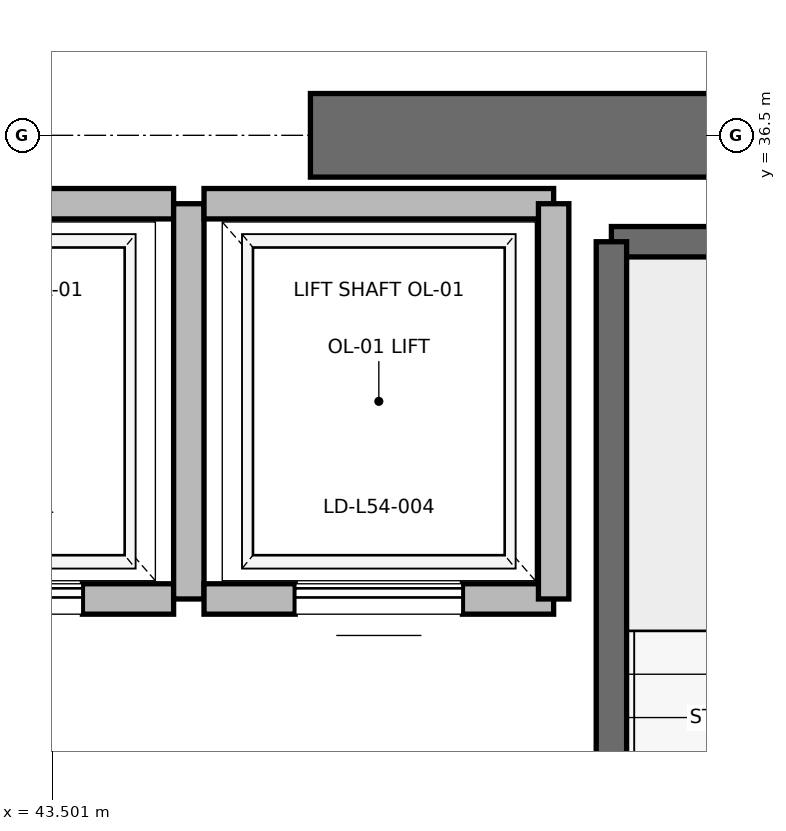
"""IFC4 building model, lengths in metres.
Left out: names, types, materials, properties, quantities, classifications, styles, units other than length and angle.
Written with IfcOpenShell. Run it as: python <this file> out.ifc"""

import sys

from ifc_helpers import new_model, si_unit, direction, frame, frame_2d, origin, place, context, subcontext, project, spatial, rectangle, extrude, element, fill, save


model = new_model("IFC4")
c1 = context("Model", 3, precision=1e-05, world=origin(), true_north=direction((0.0, 1.0)))
c2 = subcontext(c1, "Body", "Model", "MODEL_VIEW")
j1 = project(units=[si_unit("LENGTHUNIT", "METRE"), si_unit("PLANEANGLEUNIT", "RADIAN")], contexts=[c1])
p1 = place(None, origin())
s1 = spatial("IfcSite", under=j1, at=p1, CompositionType="ELEMENT")
p2 = place(p1, origin())
s2 = spatial("IfcBuilding", under=s1, at=p2, CompositionType="ELEMENT")
p3 = place(p2, frame((0.0, 0.0, 233.2)))
s3 = spatial("IfcBuildingStorey", under=s2, at=p3, CompositionType="ELEMENT", Elevation=233.2)
p4 = place(p3, frame((45.2, 36.5, 0.0), z_axis=(0.0, 0.0, 1.0), x_axis=(1.0, 0.0, 0.0)))
e1 = element("IfcWall", 1, at=p4, inside=s3, PredefinedType="SHEAR", context=c2, shape_type="SweptSolid", body=[
    extrude(rectangle(XDim=5.8, YDim=0.55, at=frame_2d((2.9, 0.0))), origin(), (0.0, 0.0, 1.0), 4.7),
])
p5 = place(p3, frame((47.18, 35.8, 0.0), z_axis=(0.0, 0.0, 1.0), x_axis=(1.0, 0.0, 0.0)))
e2 = element("IfcWall", 2, at=p5, inside=s3, PredefinedType="SOLIDWALL", context=c2, shape_type="SweptSolid", body=[
    extrude(rectangle(XDim=3.12, YDim=0.2, at=frame_2d((1.56, 0.0))), origin(), (0.0, 0.0, 1.0), 4.7),
])
p6 = place(p3, frame((47.18, 27.62, 0.0), z_axis=(0.0, 0.0, 1.0), x_axis=(0.0, 1.0, 0.0)))
e3 = element("IfcWall", 3, at=p6, inside=s3, PredefinedType="SOLIDWALL", context=c2, shape_type="SweptSolid", body=[
    extrude(rectangle(XDim=8.18, YDim=0.2, at=frame_2d((4.09, 0.0))), origin(), (0.0, 0.0, 1.0), 4.7),
])
p7 = place(p3, frame((42.0, 33.45, 0.0), z_axis=(0.0, 0.0, 1.0), x_axis=(1.0, 0.0, 0.0)))
e4 = element("IfcWall", 4, at=p7, inside=s3, PredefinedType="SOLIDWALL", context=c2, shape_type="SweptSolid", body=[
    extrude(rectangle(XDim=2.3, YDim=0.2, at=frame_2d((1.15, 0.0))), origin(), (0.0, 0.0, 1.0), 4.7),
])
p8 = place(p7, frame((0.6, 0.0, 0.0)))
e5 = element("IfcOpeningElement", 5, at=p8, cuts=e4, PredefinedType="OPENING", context=c2, shape_type="SweptSolid", body=[
    extrude(rectangle(XDim=1.1, YDim=2.2, at=frame_2d((0.55, 1.1))), frame((0.0, 0.1, 0.0), z_axis=(0.0, -1.0, 0.0), x_axis=(1.0, 0.0, 0.0)), (0.0, 0.0, 1.0), 0.2),
])
p9 = place(p3, frame((44.3, 36.05, 0.0), z_axis=(0.0, 0.0, 1.0), x_axis=(-1.0, 0.0, 0.0)))
e6 = element("IfcWall", 6, at=p9, inside=s3, PredefinedType="SOLIDWALL", context=c2, shape_type="SweptSolid", body=[
    extrude(rectangle(XDim=2.3, YDim=0.2, at=frame_2d((1.15, 0.0))), origin(), (0.0, 0.0, 1.0), 3.68),
])
p10 = place(p3, frame((44.4, 33.45, 0.0), z_axis=(0.0, 0.0, 1.0), x_axis=(0.0, 1.0, 0.0)))
e7 = element("IfcWall", 7, at=p10, inside=s3, PredefinedType="SOLIDWALL", context=c2, shape_type="SweptSolid", body=[
    extrude(rectangle(XDim=2.6, YDim=0.2, at=frame_2d((1.3, 0.0))), origin(), (0.0, 0.0, 1.0), 3.68),
])
p11 = place(p3, frame((44.5, 33.45, 0.0), z_axis=(0.0, 0.0, 1.0), x_axis=(1.0, 0.0, 0.0)))
e8 = element("IfcWall", 8, at=p11, inside=s3, PredefinedType="SOLIDWALL", context=c2, shape_type="SweptSolid", body=[
    extrude(rectangle(XDim=2.3, YDim=0.2, at=frame_2d((1.15, 0.0))), origin(), (0.0, 0.0, 1.0), 4.7),
])
p12 = place(p11, frame((0.6, 0.0, 0.0)))
e9 = element("IfcOpeningElement", 9, at=p12, cuts=e8, PredefinedType="OPENING", context=c2, shape_type="SweptSolid", body=[
    extrude(rectangle(XDim=1.1, YDim=2.2, at=frame_2d((0.55, 1.1))), frame((0.0, 0.1, 0.0), z_axis=(0.0, -1.0, 0.0), x_axis=(1.0, 0.0, 0.0)), (0.0, 0.0, 1.0), 0.2),
])
p13 = place(p3, frame((46.8, 36.05, 0.0), z_axis=(0.0, 0.0, 1.0), x_axis=(-1.0, 0.0, 0.0)))
e10 = element("IfcWall", 10, at=p13, inside=s3, PredefinedType="SOLIDWALL", context=c2, shape_type="SweptSolid", body=[
    extrude(rectangle(XDim=2.3, YDim=0.2, at=frame_2d((1.15, 0.0))), origin(), (0.0, 0.0, 1.0), 3.68),
])
p14 = place(p3, frame((46.8, 33.45, 0.0), z_axis=(0.0, 0.0, 1.0), x_axis=(0.0, 1.0, 0.0)))
e11 = element("IfcWall", 11, at=p14, inside=s3, PredefinedType="SOLIDWALL", context=c2, shape_type="SweptSolid", body=[
    extrude(rectangle(XDim=2.6, YDim=0.2, at=frame_2d((1.3, 0.0))), origin(), (0.0, 0.0, 1.0), 4.7),
])
p15 = place(p8, origin())
e12 = element("IfcDoor", 12, at=p15, inside=s3, OperationType="SLIDING_TO_RIGHT", PredefinedType="DOOR", context=c2, shape_type="SweptSolid", body=[
    extrude(rectangle(XDim=1.1, YDim=2.2, at=frame_2d((0.55, 1.1))), frame((0.0, 0.025, 0.0), z_axis=(0.0, -1.0, 0.0), x_axis=(1.0, 0.0, 0.0)), (0.0, 0.0, 1.0), 0.05),
])
fill(e5, e12)
p16 = place(p12, origin())
e13 = element("IfcDoor", 13, at=p16, inside=s3, OperationType="SLIDING_TO_RIGHT", PredefinedType="DOOR", context=c2, shape_type="SweptSolid", body=[
    extrude(rectangle(XDim=1.1, YDim=2.2, at=frame_2d((0.55, 1.1))), frame((0.0, 0.025, 0.0), z_axis=(0.0, -1.0, 0.0), x_axis=(1.0, 0.0, 0.0)), (0.0, 0.0, 1.0), 0.05),
])
fill(e9, e13)
save(model, sys.argv[1])
